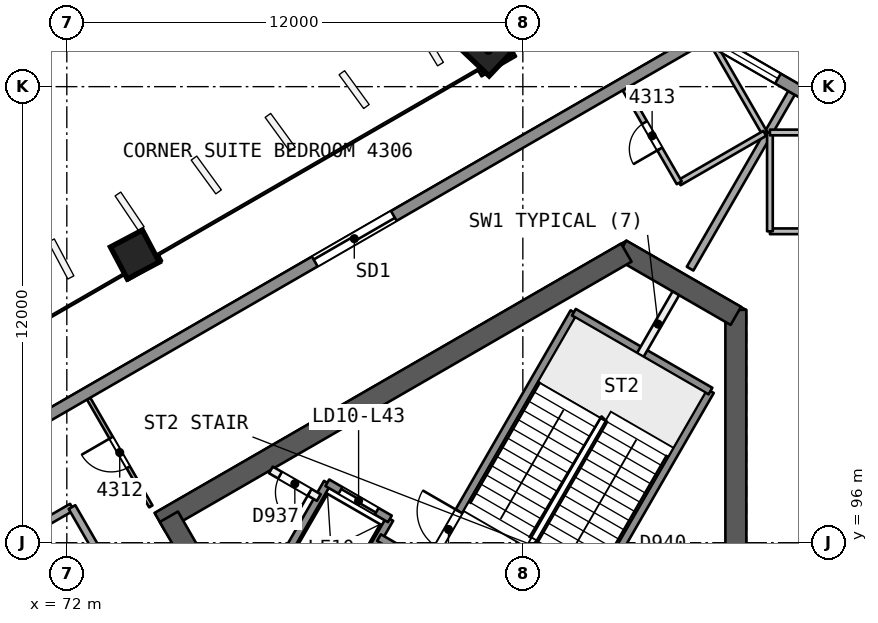
"""IFC4 building model, lengths in metres.
Left out: names, types, materials, properties, quantities, classifications, styles, units other than length and angle.
Written with IfcOpenShell. Run it as: python <this file> out.ifc"""

import sys

from ifc_helpers import new_model, si_unit, direction, frame, frame_2d, origin, origin_2d, place, context, subcontext, project, spatial, rectangle, extrude, element, fill, save


model = new_model("IFC4")
c1 = context("Model", 3, precision=1e-05, world=origin(), true_north=direction((0.0, 1.0)))
c2 = subcontext(c1, "Body", "Model", "MODEL_VIEW")
j1 = project(units=[si_unit("LENGTHUNIT", "METRE"), si_unit("PLANEANGLEUNIT", "RADIAN")], contexts=[c1])
p1 = place(None, origin())
s1 = spatial("IfcSite", under=j1, at=p1, CompositionType="ELEMENT")
p2 = place(p1, origin())
s2 = spatial("IfcBuilding", under=s1, at=p2, CompositionType="ELEMENT")
p3 = place(p2, frame((0.0, 0.0, 178.5)))
s3 = spatial("IfcBuildingStorey", under=s2, at=p3, CompositionType="ELEMENT", Elevation=178.5)
p4 = place(p3, frame((89.605, 88.069, 0.0), z_axis=(0.0, 0.0, 1.0), x_axis=(0.0, 1.0, 0.0)))
e1 = element("IfcWall", 1, at=p4, inside=s3, PredefinedType="SHEAR", context=c2, shape_type="SweptSolid", body=[
    extrude(rectangle(XDim=14.058, YDim=0.55, at=frame_2d((7.029, 0.0))), origin(), (0.0, 0.0, 1.0), 3.7),
])
p5 = place(p3, frame((89.605, 101.969, 0.0), z_axis=(0.0, 0.0, 1.0), x_axis=(-0.865997833373, 0.500047750313, 0.0)))
e2 = element("IfcWall", 2, at=p5, inside=s3, PredefinedType="SHEAR", context=c2, shape_type="SweptSolid", body=[
    extrude(rectangle(XDim=3.487, YDim=0.55, at=frame_2d((1.743, 0.0))), origin(), (0.0, 0.0, 1.0), 3.7),
])
p6 = place(p3, frame((86.723, 103.633, 0.0), z_axis=(0.0, 0.0, 1.0), x_axis=(-0.866023530946, -0.500003243837, 0.0)))
e3 = element("IfcWall", 3, at=p6, inside=s3, PredefinedType="SHEAR", context=c2, shape_type="SweptSolid", body=[
    extrude(rectangle(XDim=14.175, YDim=0.55, at=frame_2d((7.087, 0.0))), origin(), (0.0, 0.0, 1.0), 3.7),
])
p7 = place(p3, frame((74.686, 96.683, 0.0), z_axis=(0.0, 0.0, 1.0), x_axis=(0.499997818338, -0.866026663364, 0.0)))
e4 = element("IfcWall", 4, at=p7, inside=s3, PredefinedType="SHEAR", context=c2, shape_type="SweptSolid", body=[
    extrude(rectangle(XDim=10.105, YDim=0.55, at=frame_2d((5.052, 0.0))), origin(), (0.0, 0.0, 1.0), 3.7),
])
p8 = place(p7, frame((7.955, 0.0, 0.0)))
e5 = element("IfcOpeningElement", 5, at=p8, cuts=e4, PredefinedType="OPENING", context=c2, shape_type="SweptSolid", body=[
    extrude(rectangle(XDim=1.2, YDim=2.1, at=frame_2d((0.6, 1.05))), frame((0.0, 0.286, 0.0), z_axis=(0.0, -1.0, 0.0), x_axis=(1.0, 0.0, 0.0)), (0.0, 0.0, 1.0), 0.571),
])
p9 = place(p3, frame((92.42, 110.172, 0.0), z_axis=(-0.017607001884, -0.030531992032, 0.999378702468), x_axis=(0.499253360369, 0.865738917404, 0.035244986208)))
e6 = element("IfcColumn", 6, at=p9, inside=s3, PredefinedType="COLUMN", context=c2, shape_type="SweptSolid", body=[
    extrude(rectangle(XDim=2.2, YDim=2.2, at=origin_2d()), origin(), (0.0, 0.0, 1.0), 3.702),
])
p10 = place(p3, frame((83.104, 108.988, 0.0), z_axis=(-0.00837646992, -0.028097450282, 0.999570091609), x_axis=(0.86617163682, 0.499292783589, 0.021293469065)))
e7 = element("IfcColumn", 7, at=p10, inside=s3, PredefinedType="COLUMN", context=c2, shape_type="SweptSolid", body=[
    extrude(rectangle(XDim=0.95, YDim=0.95, at=origin_2d()), origin(), (0.0, 0.0, 1.0), 3.702),
])
p11 = place(p3, frame((73.789, 103.61, 0.0), z_axis=(0.000857580205, -0.022758859284, 0.9997406158), x_axis=(0.866005831592, 0.499920732377, 0.010637715398)))
e8 = element("IfcColumn", 8, at=p11, inside=s3, PredefinedType="COLUMN", context=c2, shape_type="SweptSolid", body=[
    extrude(rectangle(XDim=0.95, YDim=0.95, at=origin_2d()), origin(), (0.0, 0.0, 1.0), 3.701),
])
p12 = place(p3, frame((93.353, 104.194, 0.0), z_axis=(0.0, 0.0, 1.0), x_axis=(-1.0, 0.0, 0.0)))
e9 = element("IfcWall", 9, at=p12, inside=s3, PredefinedType="PARTITIONING", context=c2, shape_type="SweptSolid", body=[
    extrude(rectangle(XDim=2.852, YDim=0.15, at=frame_2d((1.426, 0.0))), origin(), (0.0, 0.0, 1.0), 3.25),
])
p13 = place(p12, frame((1.026, 0.0, 0.0)))
e10 = element("IfcOpeningElement", 10, at=p13, cuts=e9, PredefinedType="OPENING", context=c2, shape_type="SweptSolid", body=[
    extrude(rectangle(XDim=0.8, YDim=2.1, at=frame_2d((0.4, 1.05))), frame((0.0, 0.085, 0.0), z_axis=(0.0, -1.0, 0.0), x_axis=(1.0, 0.0, 0.0)), (0.0, 0.0, 1.0), 0.171),
])
p14 = place(p3, frame((90.501, 104.194, 0.0), z_axis=(0.0, 0.0, 1.0), x_axis=(0.0, 1.0, 0.0)))
e11 = element("IfcWall", 11, at=p14, inside=s3, PredefinedType="PARTITIONING", context=c2, shape_type="SweptSolid", body=[
    extrude(rectangle(XDim=2.6, YDim=0.15, at=frame_2d((1.3, 0.0))), origin(), (0.0, 0.0, 1.0), 3.25),
])
p15 = place(p3, frame((90.501, 106.794, 0.0), z_axis=(0.0, 0.0, 1.0), x_axis=(1.0, 0.0, 0.0)))
e12 = element("IfcWall", 12, at=p15, inside=s3, PredefinedType="PARTITIONING", context=c2, shape_type="SweptSolid", body=[
    extrude(rectangle(XDim=2.371, YDim=0.15, at=frame_2d((1.186, 0.0))), origin(), (0.0, 0.0, 1.0), 3.25),
])
p16 = place(p3, frame((91.07, 107.835, 0.0), z_axis=(0.0, 0.0, 1.0), x_axis=(-0.499970524249, -0.866042420948, 0.0)))
e13 = element("IfcWall", 13, at=p16, inside=s3, PredefinedType="PARTITIONING", context=c2, shape_type="SweptSolid", body=[
    extrude(rectangle(XDim=5.339, YDim=0.2, at=frame_2d((2.669, 0.0))), origin(), (0.0, 0.0, 1.0), 3.25),
])
p17 = place(p3, frame((74.21, 96.956, 0.0), z_axis=(0.0, 0.0, 1.0), x_axis=(-0.499980647919, 0.866036576425, 0.0)))
e14 = element("IfcWall", 14, at=p17, inside=s3, PredefinedType="PARTITIONING", context=c2, shape_type="SweptSolid", body=[
    extrude(rectangle(XDim=3.274, YDim=0.1, at=frame_2d((1.637, 0.0))), origin(), (0.0, 0.0, 1.0), 3.25),
])
p18 = place(p17, frame((1.187, 0.0, 0.0)))
e15 = element("IfcOpeningElement", 15, at=p18, cuts=e14, PredefinedType="OPENING", context=c2, shape_type="SweptSolid", body=[
    extrude(rectangle(XDim=0.9, YDim=2.1, at=frame_2d((0.45, 1.05))), frame((0.0, 0.061, 0.0), z_axis=(0.0, -1.0, 0.0), x_axis=(1.0, 0.0, 0.0)), (0.0, 0.0, 1.0), 0.121),
])
p19 = place(p3, frame((74.904, 88.143, 0.0), z_axis=(0.0, 0.0, 1.0), x_axis=(-0.499990139034, 0.866031096941, 0.0)))
e16 = element("IfcWall", 16, at=p19, inside=s3, PredefinedType="PARTITIONING", context=c2, shape_type="SweptSolid", body=[
    extrude(rectangle(XDim=9.0, YDim=0.2, at=frame_2d((4.5, 0.0))), origin(), (0.0, 0.0, 1.0), 3.25),
])
p20 = place(p19, frame((4.05, 0.0, 0.0)))
e17 = element("IfcOpeningElement", 17, at=p20, cuts=e16, PredefinedType="OPENING", context=c2, shape_type="SweptSolid", body=[
    extrude(rectangle(XDim=0.9, YDim=2.1, at=frame_2d((0.45, 1.05))), frame((0.0, 0.11, 0.0), z_axis=(0.0, -1.0, 0.0), x_axis=(1.0, 0.0, 0.0)), (0.0, 0.0, 1.0), 0.221),
])
p21 = place(p3, frame((70.404, 95.937, 0.0), z_axis=(0.0, 0.0, 1.0), x_axis=(0.866010750942, 0.50002537861, 0.0)))
e18 = element("IfcWall", 18, at=p21, inside=s3, PredefinedType="PARTITIONING", context=c2, shape_type="SweptSolid", body=[
    extrude(rectangle(XDim=2.0, YDim=0.2, at=frame_2d((1.0, 0.0))), origin(), (0.0, 0.0, 1.0), 3.25),
])
p22 = place(p3, frame((72.136, 96.937, 0.0), z_axis=(0.0, 0.0, 1.0), x_axis=(0.499990139034, -0.866031096941, 0.0)))
e19 = element("IfcWall", 19, at=p22, inside=s3, PredefinedType="PARTITIONING", context=c2, shape_type="SweptSolid", body=[
    extrude(rectangle(XDim=9.0, YDim=0.2, at=frame_2d((4.5, 0.0))), origin(), (0.0, 0.0, 1.0), 3.25),
])
p23 = place(p3, frame((67.714, 96.985, 0.0), z_axis=(0.0, 0.0, 1.0), x_axis=(0.499998524228, -0.86602625582, 0.0)))
e20 = element("IfcWall", 20, at=p23, inside=s3, PredefinedType="PARTITIONING", context=c2, shape_type="SweptSolid", body=[
    extrude(rectangle(XDim=11.253, YDim=0.2, at=frame_2d((5.626, 0.0))), origin(), (0.0, 0.0, 1.0), 3.25),
])
p24 = place(p3, frame((89.094, 108.976, 0.0), z_axis=(0.0, 0.0, 1.0), x_axis=(0.499935570486, -0.866062598986, 0.0)))
e21 = element("IfcWall", 21, at=p24, inside=s3, PredefinedType="PARTITIONING", context=c2, shape_type="SweptSolid", body=[
    extrude(rectangle(XDim=2.545, YDim=0.15, at=frame_2d((1.272, 0.0))), origin(), (0.0, 0.0, 1.0), 3.25),
])
p25 = place(p3, frame((90.366, 106.771, 0.0), z_axis=(0.0, 0.0, 1.0), x_axis=(-0.865997922154, -0.500047596559, 0.0)))
e22 = element("IfcWall", 22, at=p25, inside=s3, PredefinedType="PARTITIONING", context=c2, shape_type="SweptSolid", body=[
    extrude(rectangle(XDim=2.6, YDim=0.15, at=frame_2d((1.3, 0.0))), origin(), (0.0, 0.0, 1.0), 3.25),
])
p26 = place(p3, frame((88.115, 105.471, 0.0), z_axis=(0.0, 0.0, 1.0), x_axis=(-0.500006551472, 0.866021621257, 0.0)))
e23 = element("IfcWall", 23, at=p26, inside=s3, PredefinedType="PARTITIONING", context=c2, shape_type="SweptSolid", body=[
    extrude(rectangle(XDim=2.852, YDim=0.15, at=frame_2d((1.426, 0.0))), origin(), (0.0, 0.0, 1.0), 3.25),
])
p27 = place(p26, frame((1.026, 0.0, 0.0)))
e24 = element("IfcOpeningElement", 24, at=p27, cuts=e23, PredefinedType="OPENING", context=c2, shape_type="SweptSolid", body=[
    extrude(rectangle(XDim=0.8, YDim=2.1, at=frame_2d((0.4, 1.05))), frame((0.0, 0.085, 0.0), z_axis=(0.0, -1.0, 0.0), x_axis=(1.0, 0.0, 0.0)), (0.0, 0.0, 1.0), 0.171),
])
p28 = place(p3, frame((88.788, 109.324, 0.0), z_axis=(0.0, 0.0, 1.0), x_axis=(0.866026498114, -0.499998104561, 0.0)))
e25 = element("IfcWall", 25, at=p28, inside=s3, PredefinedType="SOLIDWALL", context=c2, shape_type="SweptSolid", body=[
    extrude(rectangle(XDim=5.443, YDim=0.3, at=frame_2d((2.722, 0.0))), origin(), (0.0, 0.0, 1.0), 3.25),
])
p29 = place(p28, frame((3.122, 0.0, 0.9)))
e26 = element("IfcOpeningElement", 26, at=p29, cuts=e25, PredefinedType="OPENING", context=c2, shape_type="SweptSolid", body=[
    extrude(rectangle(XDim=1.8, YDim=1.5, at=frame_2d((0.9, 0.75))), frame((0.0, 0.161, 0.0), z_axis=(0.0, -1.0, 0.0), x_axis=(1.0, 0.0, 0.0)), (0.0, 0.0, 1.0), 0.321),
])
p30 = place(p28, frame((0.423, 0.0, 0.9)))
e27 = element("IfcOpeningElement", 27, at=p30, cuts=e25, PredefinedType="OPENING", context=c2, shape_type="SweptSolid", body=[
    extrude(rectangle(XDim=1.8, YDim=1.5, at=frame_2d((0.9, 0.75))), frame((0.0, 0.161, 0.0), z_axis=(0.0, -1.0, 0.0), x_axis=(1.0, 0.0, 0.0)), (0.0, 0.0, 1.0), 0.321),
])
p31 = place(p3, frame((42.71, 82.722, 0.0), z_axis=(0.0, 0.0, 1.0), x_axis=(0.866026647012, 0.499997846661, 0.0)))
e28 = element("IfcWall", 28, at=p31, inside=s3, PredefinedType="SOLIDWALL", context=c2, shape_type="SweptSolid", body=[
    extrude(rectangle(XDim=53.206, YDim=0.3, at=frame_2d((26.603, 0.0))), origin(), (0.0, 0.0, 1.0), 3.25),
])
p32 = place(p31, frame((30.391, 0.0, 0.0)))
e29 = element("IfcOpeningElement", 29, at=p32, cuts=e28, PredefinedType="OPENING", context=c2, shape_type="SweptSolid", body=[
    extrude(rectangle(XDim=2.4, YDim=2.4, at=frame_2d((1.2, 1.2))), frame((0.0, 0.161, 0.0), z_axis=(0.0, -1.0, 0.0), x_axis=(1.0, 0.0, 0.0)), (0.0, 0.0, 1.0), 0.321),
])
p33 = place(p31, frame((41.356, 0.0, 0.0)))
e30 = element("IfcOpeningElement", 30, at=p33, cuts=e28, PredefinedType="OPENING", context=c2, shape_type="SweptSolid", body=[
    extrude(rectangle(XDim=2.4, YDim=2.4, at=frame_2d((1.2, 1.2))), frame((0.0, 0.161, 0.0), z_axis=(0.0, -1.0, 0.0), x_axis=(1.0, 0.0, 0.0)), (0.0, 0.0, 1.0), 0.321),
])
p34 = place(p31, frame((19.635, 0.0, 0.0)))
e31 = element("IfcOpeningElement", 31, at=p34, cuts=e28, PredefinedType="OPENING", context=c2, shape_type="SweptSolid", body=[
    extrude(rectangle(XDim=2.4, YDim=2.4, at=frame_2d((1.2, 1.2))), frame((0.0, 0.161, 0.0), z_axis=(0.0, -1.0, 0.0), x_axis=(1.0, 0.0, 0.0)), (0.0, 0.0, 1.0), 0.321),
])
p35 = place(p31, frame((9.4, 0.0, 0.0)))
e32 = element("IfcOpeningElement", 32, at=p35, cuts=e28, PredefinedType="OPENING", context=c2, shape_type="SweptSolid", body=[
    extrude(rectangle(XDim=2.4, YDim=2.4, at=frame_2d((1.2, 1.2))), frame((0.0, 0.161, 0.0), z_axis=(0.0, -1.0, 0.0), x_axis=(1.0, 0.0, 0.0)), (0.0, 0.0, 1.0), 0.321),
])
p36 = place(p31, frame((26.404, 0.0, 0.9)))
e33 = element("IfcOpeningElement", 33, at=p36, cuts=e28, PredefinedType="OPENING", context=c2, shape_type="SweptSolid", body=[
    extrude(rectangle(XDim=1.8, YDim=1.5, at=frame_2d((0.9, 0.75))), frame((0.0, 0.161, 0.0), z_axis=(0.0, -1.0, 0.0), x_axis=(1.0, 0.0, 0.0)), (0.0, 0.0, 1.0), 0.321),
])
p37 = place(p31, frame((23.442, 0.0, 0.9)))
e34 = element("IfcOpeningElement", 34, at=p37, cuts=e28, PredefinedType="OPENING", context=c2, shape_type="SweptSolid", body=[
    extrude(rectangle(XDim=1.8, YDim=1.5, at=frame_2d((0.9, 0.75))), frame((0.0, 0.161, 0.0), z_axis=(0.0, -1.0, 0.0), x_axis=(1.0, 0.0, 0.0)), (0.0, 0.0, 1.0), 0.321),
])
p38 = place(p3, frame((85.087, 93.321, 0.0), z_axis=(0.0, 0.0, 1.0), x_axis=(0.500019787375, 0.866013979237, 0.0)))
e35 = element("IfcWall", 35, at=p38, inside=s3, PredefinedType="SOLIDWALL", context=c2, shape_type="SweptSolid", body=[
    extrude(rectangle(XDim=7.7, YDim=0.2, at=frame_2d((3.85, 0.0))), origin(), (0.0, 0.0, 1.0), 3.25),
])
p39 = place(p3, frame((87.09, 100.94, 0.0), z_axis=(0.0, 0.0, 1.0), x_axis=(0.499951854219, 0.86605319898, 0.0)))
e36 = element("IfcWall", 36, at=p39, inside=s3, PredefinedType="PARTITIONING", context=c2, shape_type="SweptSolid", body=[
    extrude(rectangle(XDim=1.873, YDim=0.2, at=frame_2d((0.937, 0.0))), origin(), (0.0, 0.0, 1.0), 3.25),
])
p40 = place(p3, frame((81.493, 95.396, 0.0), z_axis=(0.0, 0.0, 1.0), x_axis=(0.500006057782, 0.866021906294, 0.0)))
e37 = element("IfcWall", 37, at=p40, inside=s3, PredefinedType="SOLIDWALL", context=c2, shape_type="SweptSolid", body=[
    extrude(rectangle(XDim=7.7, YDim=0.2, at=frame_2d((3.85, 0.0))), origin(), (0.0, 0.0, 1.0), 3.25),
])
p41 = place(p40, frame((0.55, 0.0, 0.0)))
e38 = element("IfcOpeningElement", 38, at=p41, cuts=e37, PredefinedType="OPENING", context=c2, shape_type="SweptSolid", body=[
    extrude(rectangle(XDim=1.1, YDim=2.1, at=frame_2d((0.55, 1.05))), frame((0.0, 0.11, 0.0), z_axis=(0.0, -1.0, 0.0), x_axis=(1.0, 0.0, 0.0)), (0.0, 0.0, 1.0), 0.221),
])
for number, where, z_axis, x_axis in (
    (39, (78.976, 93.986, 0.0), (0.0, 0.0, 1.0), (0.5, 0.866, 0.0)),
    (40, (77.33, 94.936, 0.0), (0.0, 0.0, 1.0), (0.5, 0.866, 0.0)),
):
    element("IfcWall", number, at=place(p3, frame(where, z_axis=z_axis, x_axis=x_axis)), inside=s3, PredefinedType="SOLIDWALL", context=c2, shape_type="SweptSolid", body=[
        extrude(rectangle(XDim=3.05, YDim=0.2, at=frame_2d((1.525, 0.0))), origin(), (0.0, 0.0, 1.0), 3.25),
    ])
p42 = place(p3, frame((89.33, 90.872, 0.0), z_axis=(0.0, 0.0, 1.0), x_axis=(-0.866027589512, 0.49999621419, 0.0)))
e41 = element("IfcWall", 41, at=p42, inside=s3, PredefinedType="SOLIDWALL", context=c2, shape_type="SweptSolid", body=[
    extrude(rectangle(XDim=10.524, YDim=0.2, at=frame_2d((5.262, 0.0))), origin(), (0.0, 0.0, 1.0), 3.25),
])
p43 = place(p42, frame((0.312, 0.0, 0.0)))
e42 = element("IfcOpeningElement", 42, at=p43, cuts=e41, PredefinedType="OPENING", context=c2, shape_type="SweptSolid", body=[
    extrude(rectangle(XDim=0.9, YDim=2.1, at=frame_2d((0.45, 1.05))), frame((0.0, 0.11, 0.0), z_axis=(0.0, -1.0, 0.0), x_axis=(1.0, 0.0, 0.0)), (0.0, 0.0, 1.0), 0.221),
])
p44 = place(p3, frame((78.63, 97.188, 0.0), z_axis=(0.0, 0.0, 1.0), x_axis=(-0.866003949776, 0.500037157592, 0.0)))
e43 = element("IfcWall", 43, at=p44, inside=s3, PredefinedType="PARTITIONING", context=c2, shape_type="SweptSolid", body=[
    extrude(rectangle(XDim=1.455, YDim=0.2, at=frame_2d((0.728, 0.0))), origin(), (0.0, 0.0, 1.0), 3.25),
])
p45 = place(p44, frame((0.278, 0.0, 0.0)))
e44 = element("IfcOpeningElement", 44, at=p45, cuts=e43, PredefinedType="OPENING", context=c2, shape_type="SweptSolid", body=[
    extrude(rectangle(XDim=0.9, YDim=2.1, at=frame_2d((0.45, 1.05))), frame((0.0, 0.11, 0.0), z_axis=(0.0, -1.0, 0.0), x_axis=(1.0, 0.0, 0.0)), (0.0, 0.0, 1.0), 0.221),
])
p46 = place(p3, frame((80.5, 96.627, 0.0), z_axis=(0.0, 0.0, 1.0), x_axis=(-0.86601224135, 0.500022797313, 0.0)))
e45 = element("IfcWall", 45, at=p46, inside=s3, PredefinedType="SOLIDWALL", context=c2, shape_type="SweptSolid", body=[
    extrude(rectangle(XDim=1.9, YDim=0.2, at=frame_2d((0.95, 0.0))), origin(), (0.0, 0.0, 1.0), 3.25),
])
p47 = place(p46, frame((0.4, 0.0, 0.0)))
e46 = element("IfcOpeningElement", 46, at=p47, cuts=e45, PredefinedType="OPENING", context=c2, shape_type="SweptSolid", body=[
    extrude(rectangle(XDim=1.1, YDim=2.1, at=frame_2d((0.55, 1.05))), frame((0.0, 0.11, 0.0), z_axis=(0.0, -1.0, 0.0), x_axis=(1.0, 0.0, 0.0)), (0.0, 0.0, 1.0), 0.221),
])
p48 = place(p3, frame((88.937, 99.99, 0.0), z_axis=(0.0, 0.0, 1.0), x_axis=(-0.866004344652, 0.500036473714, 0.0)))
e47 = element("IfcWall", 47, at=p48, inside=s3, PredefinedType="SOLIDWALL", context=c2, shape_type="SweptSolid", body=[
    extrude(rectangle(XDim=4.15, YDim=0.2, at=frame_2d((2.075, 0.0))), origin(), (0.0, 0.0, 1.0), 3.25),
])
p49 = place(p18, origin())
e48 = element("IfcDoor", 48, at=p49, inside=s3, OperationType="SINGLE_SWING_RIGHT", PredefinedType="NOTDEFINED", context=c2, shape_type="SweptSolid", body=[
    extrude(rectangle(XDim=0.9, YDim=2.1, at=frame_2d((0.45, 1.05))), frame((0.0, 0.025, 0.0), z_axis=(0.0, -1.0, 0.0), x_axis=(1.0, 0.0, 0.0)), (0.0, 0.0, 1.0), 0.05),
])
fill(e15, e48)
p50 = place(p27, origin())
e49 = element("IfcDoor", 49, at=p50, inside=s3, OperationType="SINGLE_SWING_LEFT", PredefinedType="NOTDEFINED", context=c2, shape_type="SweptSolid", body=[
    extrude(rectangle(XDim=0.8, YDim=2.1, at=frame_2d((0.4, 1.05))), frame((0.0, 0.025, 0.0), z_axis=(0.0, -1.0, 0.0), x_axis=(1.0, 0.0, 0.0)), (0.0, 0.0, 1.0), 0.05),
])
fill(e24, e49)
p51 = place(p30, origin())
e50 = element("IfcWindow", 50, at=p51, inside=s3, PartitioningType="SINGLE_PANEL", PredefinedType="WINDOW", context=c2, shape_type="SweptSolid", body=[
    extrude(rectangle(XDim=1.8, YDim=1.5, at=frame_2d((0.9, 0.75))), frame((0.0, 0.03, 0.0), z_axis=(0.0, -1.0, 0.0), x_axis=(1.0, 0.0, 0.0)), (0.0, 0.0, 1.0), 0.06),
])
fill(e27, e50)
p52 = place(p33, origin())
e51 = element("IfcDoor", 51, at=p52, inside=s3, OperationType="SLIDING_TO_RIGHT", PredefinedType="NOTDEFINED", context=c2, shape_type="SweptSolid", body=[
    extrude(rectangle(XDim=2.4, YDim=2.4, at=frame_2d((1.2, 1.2))), frame((0.0, 0.025, 0.0), z_axis=(0.0, -1.0, 0.0), x_axis=(1.0, 0.0, 0.0)), (0.0, 0.0, 1.0), 0.05),
])
fill(e30, e51)
p53 = place(p47, origin())
e52 = element("IfcDoor", 52, at=p53, inside=s3, OperationType="SLIDING_TO_RIGHT", PredefinedType="NOTDEFINED", context=c2, shape_type="SweptSolid", body=[
    extrude(rectangle(XDim=1.1, YDim=2.1, at=frame_2d((0.55, 1.05))), frame((0.0, 0.025, 0.0), z_axis=(0.0, -1.0, 0.0), x_axis=(1.0, 0.0, 0.0)), (0.0, 0.0, 1.0), 0.05),
])
fill(e46, e52)
p54 = place(p45, origin())
e53 = element("IfcDoor", 53, at=p54, inside=s3, OperationType="SINGLE_SWING_LEFT", PredefinedType="NOTDEFINED", context=c2, shape_type="SweptSolid", body=[
    extrude(rectangle(XDim=0.9, YDim=2.1, at=frame_2d((0.45, 1.05))), frame((0.0, 0.025, 0.0), z_axis=(0.0, -1.0, 0.0), x_axis=(1.0, 0.0, 0.0)), (0.0, 0.0, 1.0), 0.05),
])
fill(e44, e53)
p55 = place(p41, origin())
e54 = element("IfcDoor", 54, at=p55, inside=s3, OperationType="SINGLE_SWING_RIGHT", PredefinedType="NOTDEFINED", context=c2, shape_type="SweptSolid", body=[
    extrude(rectangle(XDim=1.1, YDim=2.1, at=frame_2d((0.55, 1.05))), frame((0.0, 0.025, 0.0), z_axis=(0.0, -1.0, 0.0), x_axis=(1.0, 0.0, 0.0)), (0.0, 0.0, 1.0), 0.05),
])
fill(e38, e54)
save(model, sys.argv[1])
